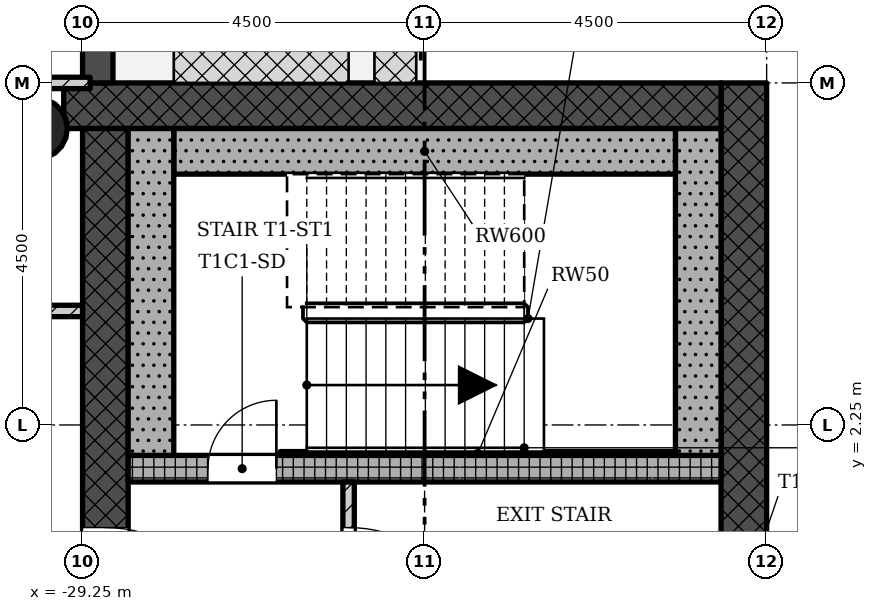
"""IFC4 building model, lengths in metres.
Left out: names, types, materials, properties, quantities, classifications, styles, units other than length and angle.
Written with IfcOpenShell. Run it as: python <this file> out.ifc"""

import sys

from ifc_helpers import new_model, si_unit, direction, frame, frame_2d, origin, origin_2d, place, context, subcontext, project, spatial, rectangle, hollow_circle, extrude, element, fill, save


model = new_model("IFC4")
c1 = context("Model", 3, precision=1e-05, world=origin(), true_north=direction((0.0, 1.0)))
c2 = subcontext(c1, "Body", "Model", "MODEL_VIEW")
j1 = project(units=[si_unit("LENGTHUNIT", "METRE"), si_unit("PLANEANGLEUNIT", "RADIAN")], contexts=[c1])
p1 = place(None, origin())
s1 = spatial("IfcSite", under=j1, at=p1, CompositionType="ELEMENT")
p2 = place(p1, origin())
s2 = spatial("IfcBuilding", under=s1, at=p2, CompositionType="ELEMENT")
p3 = place(p2, frame((0.0, 0.0, 242.4)))
s3 = spatial("IfcBuildingStorey", under=s2, at=p3, CompositionType="ELEMENT", Elevation=242.4)
p4 = place(p3, frame((-20.55, -6.15, 0.0), z_axis=(0.0, 0.0, 1.0), x_axis=(0.0, 1.0, 0.0)))
e1 = element("IfcWall", 1, at=p4, inside=s3, PredefinedType="SHEAR", context=c2, shape_type="SweptSolid", body=[
    extrude(rectangle(XDim=12.9, YDim=0.6, at=frame_2d((6.45, 0.0))), origin(), (0.0, 0.0, 1.0), 4.5),
])
p5 = place(p4, frame((5.7, 0.0, 0.45)))
e2 = element("IfcOpeningElement", 2, at=p5, cuts=e1, PredefinedType="OPENING", context=c2, shape_type="SweptSolid", body=[
    extrude(rectangle(XDim=0.9, YDim=2.4, at=frame_2d((0.45, 1.2))), frame((0.0, 0.31, 0.0), z_axis=(0.0, -1.0, 0.0), x_axis=(1.0, 0.0, 0.0)), (0.0, 0.0, 1.0), 0.62),
])
p6 = place(p3, frame((-20.85, 6.45, 0.0), z_axis=(0.0, 0.0, 1.0), x_axis=(-1.0, 0.0, 0.0)))
e3 = element("IfcWall", 3, at=p6, inside=s3, PredefinedType="SHEAR", context=c2, shape_type="SweptSolid", body=[
    extrude(rectangle(XDim=8.648, YDim=0.6, at=frame_2d((4.324, 0.0))), origin(), (0.0, 0.0, 1.0), 4.5),
])
p7 = place(p3, frame((-28.95, 6.15, 0.0), z_axis=(0.0, 0.0, 1.0), x_axis=(0.0, -1.0, 0.0)))
e4 = element("IfcWall", 4, at=p7, inside=s3, PredefinedType="SHEAR", context=c2, shape_type="SweptSolid", body=[
    extrude(rectangle(XDim=12.9, YDim=0.6, at=frame_2d((6.45, 0.0))), origin(), (0.0, 0.0, 1.0), 4.5),
])
p8 = place(p7, frame((5.25, 0.0, 0.0)))
e5 = element("IfcOpeningElement", 5, at=p8, cuts=e4, PredefinedType="OPENING", context=c2, shape_type="SweptSolid", body=[
    extrude(rectangle(XDim=1.8, YDim=2.1, at=frame_2d((0.9, 1.05))), frame((0.0, 0.31, 0.0), z_axis=(0.0, -1.0, 0.0), x_axis=(1.0, 0.0, 0.0)), (0.0, 0.0, 1.0), 0.62),
])
p9 = place(p3, frame((-28.65, 1.675, 0.0), z_axis=(0.0, 0.0, 1.0), x_axis=(1.0, 0.0, 0.0)))
e6 = element("IfcWall", 6, at=p9, inside=s3, PredefinedType="SHEAR", context=c2, shape_type="SweptSolid", body=[
    extrude(rectangle(XDim=7.8, YDim=0.35, at=frame_2d((3.9, 0.0))), origin(), (0.0, 0.0, 1.0), 4.5),
])
p10 = place(p9, frame((1.05, 0.0, 0.0)))
e7 = element("IfcOpeningElement", 7, at=p10, cuts=e6, PredefinedType="OPENING", context=c2, shape_type="SweptSolid", body=[
    extrude(rectangle(XDim=0.9, YDim=2.1, at=frame_2d((0.45, 1.05))), frame((0.0, 0.185, 0.0), z_axis=(0.0, -1.0, 0.0), x_axis=(1.0, 0.0, 0.0)), (0.0, 0.0, 1.0), 0.37),
])
p11 = place(p3, frame((-29.85, 6.15, 0.0), z_axis=(0.0, 0.0, 1.0), x_axis=(1.0, 0.0, 0.0)))
e8 = element("IfcColumn", 8, at=p11, inside=s3, PredefinedType="COLUMN", context=c2, shape_type="SweptSolid", body=[
    extrude(hollow_circle(Radius=0.4, WallThickness=0.028, at=origin_2d()), origin(), (0.0, 0.0, 1.0), 4.5),
])
p12 = place(p3, frame((-29.05, 6.75, -0.02), z_axis=(0.0, 0.0, 1.0), x_axis=(0.0, 1.0, 0.0)))
e9 = element("IfcWall", 9, at=p12, inside=s3, PredefinedType="STANDARD", context=c2, shape_type="SweptSolid", body=[
    extrude(rectangle(XDim=4.5, YDim=0.4, at=frame_2d((2.25, 0.0))), origin(), (0.0, 0.0, 1.0), 4.22),
])
p13 = place(p12, frame((1.35, 0.0, 0.02)))
e10 = element("IfcOpeningElement", 10, at=p13, cuts=e9, PredefinedType="OPENING", context=c2, shape_type="SweptSolid", body=[
    extrude(rectangle(XDim=1.8, YDim=2.1, at=frame_2d((0.9, 1.05))), frame((0.0, 0.21, 0.0), z_axis=(0.0, -1.0, 0.0), x_axis=(1.0, 0.0, 0.0)), (0.0, 0.0, 1.0), 0.42),
])
p14 = place(p3, frame((-25.75, -1.5, 0.0), z_axis=(0.0, 0.0, 1.0), x_axis=(0.0, 1.0, 0.0)))
e11 = element("IfcWall", 11, at=p14, inside=s3, PredefinedType="PARTITIONING", context=c2, shape_type="SweptSolid", body=[
    extrude(rectangle(XDim=3.0, YDim=0.15, at=frame_2d((1.5, 0.0))), origin(), (0.0, 0.0, 1.0), 4.08),
])
p15 = place(p14, frame((0.6, 0.0, 0.0)))
e12 = element("IfcOpeningElement", 12, at=p15, cuts=e11, PredefinedType="OPENING", context=c2, shape_type="SweptSolid", body=[
    extrude(rectangle(XDim=1.8, YDim=2.1, at=frame_2d((0.9, 1.05))), frame((0.0, 0.085, 0.0), z_axis=(0.0, -1.0, 0.0), x_axis=(1.0, 0.0, 0.0)), (0.0, 0.0, 1.0), 0.17),
])
p16 = place(p3, frame((-33.75, 3.75, 0.0), z_axis=(0.0, 0.0, 1.0), x_axis=(1.0, 0.0, 0.0)))
e13 = element("IfcWall", 13, at=p16, inside=s3, PredefinedType="PARTITIONING", context=c2, shape_type="SweptSolid", body=[
    extrude(rectangle(XDim=4.5, YDim=0.15, at=frame_2d((2.25, 0.0))), origin(), (0.0, 0.0, 1.0), 4.08),
])
p17 = place(p3, frame((-42.85, 6.75, 0.0), z_axis=(0.0, 0.0, 1.0), x_axis=(1.0, 0.0, 0.0)))
e14 = element("IfcWall", 14, at=p17, inside=s3, PredefinedType="PARTITIONING", context=c2, shape_type="SweptSolid", body=[
    extrude(rectangle(XDim=13.7, YDim=0.15, at=frame_2d((6.85, 0.0))), origin(), (0.0, 0.0, 1.0), 4.08),
])
p18 = place(p17, frame((5.95, 0.0, 0.0)))
e15 = element("IfcOpeningElement", 15, at=p18, cuts=e14, PredefinedType="OPENING", context=c2, shape_type="SweptSolid", body=[
    extrude(rectangle(XDim=1.8, YDim=2.1, at=frame_2d((0.9, 1.05))), frame((0.0, 0.085, 0.0), z_axis=(0.0, -1.0, 0.0), x_axis=(1.0, 0.0, 0.0)), (0.0, 0.0, 1.0), 0.17),
])
p19 = place(p3, frame((-21.15, 1.85, 0.0), z_axis=(0.0, 0.0, 1.0), x_axis=(0.0, 1.0, 0.0)))
e16 = element("IfcWall", 16, at=p19, inside=s3, PredefinedType="SHEAR", context=c2, shape_type="SweptSolid", body=[
    extrude(rectangle(XDim=4.3, YDim=0.6, at=frame_2d((2.15, 0.0))), origin(), (0.0, 0.0, 1.0), 4.5),
])
p20 = place(p3, frame((-28.05, 5.85, 0.0), z_axis=(0.0, 0.0, 1.0), x_axis=(1.0, 0.0, 0.0)))
e17 = element("IfcWall", 17, at=p20, inside=s3, PredefinedType="SHEAR", context=c2, shape_type="SweptSolid", body=[
    extrude(rectangle(XDim=6.6, YDim=0.6, at=frame_2d((3.3, 0.0))), origin(), (0.0, 0.0, 1.0), 4.5),
])
p21 = place(p3, frame((-28.35, 1.85, 0.0), z_axis=(0.0, 0.0, 1.0), x_axis=(0.0, 1.0, 0.0)))
e18 = element("IfcWall", 18, at=p21, inside=s3, PredefinedType="SHEAR", context=c2, shape_type="SweptSolid", body=[
    extrude(rectangle(XDim=4.3, YDim=0.6, at=frame_2d((2.15, 0.0))), origin(), (0.0, 0.0, 1.0), 4.5),
])
p22 = place(p3, frame((-26.65, 1.875, 0.0), z_axis=(0.0, 0.0, 1.0), x_axis=(1.0, 0.0, 0.0)))
e19 = element("IfcWall", 19, at=p22, inside=s3, PredefinedType="SHEAR", context=c2, shape_type="SweptSolid", body=[
    extrude(rectangle(XDim=5.2, YDim=0.05, at=frame_2d((2.6, 0.0))), origin(), (0.0, 0.0, 1.0), 4.5),
])
p23 = place(p15, origin())
e20 = element("IfcDoor", 20, at=p23, inside=s3, OperationType="SINGLE_SWING_LEFT", PredefinedType="DOOR", context=c2, shape_type="SweptSolid", body=[
    extrude(rectangle(XDim=1.8, YDim=2.1, at=frame_2d((0.9, 1.05))), frame((0.0, 0.025, 0.0), z_axis=(0.0, -1.0, 0.0), x_axis=(1.0, 0.0, 0.0)), (0.0, 0.0, 1.0), 0.05),
])
fill(e12, e20)
p24 = place(p10, origin())
e21 = element("IfcDoor", 21, at=p24, inside=s3, OperationType="SINGLE_SWING_LEFT", PredefinedType="DOOR", context=c2, shape_type="SweptSolid", body=[
    extrude(rectangle(XDim=0.9, YDim=2.1, at=frame_2d((0.45, 1.05))), frame((0.0, 0.025, 0.0), z_axis=(0.0, -1.0, 0.0), x_axis=(1.0, 0.0, 0.0)), (0.0, 0.0, 1.0), 0.05),
])
fill(e7, e21)
p25 = place(p8, origin())
e22 = element("IfcDoor", 22, at=p25, inside=s3, OperationType="SINGLE_SWING_LEFT", PredefinedType="DOOR", context=c2, shape_type="SweptSolid", body=[
    extrude(rectangle(XDim=1.8, YDim=2.1, at=frame_2d((0.9, 1.05))), frame((0.0, 0.025, 0.0), z_axis=(0.0, -1.0, 0.0), x_axis=(1.0, 0.0, 0.0)), (0.0, 0.0, 1.0), 0.05),
])
fill(e5, e22)
save(model, sys.argv[1])
